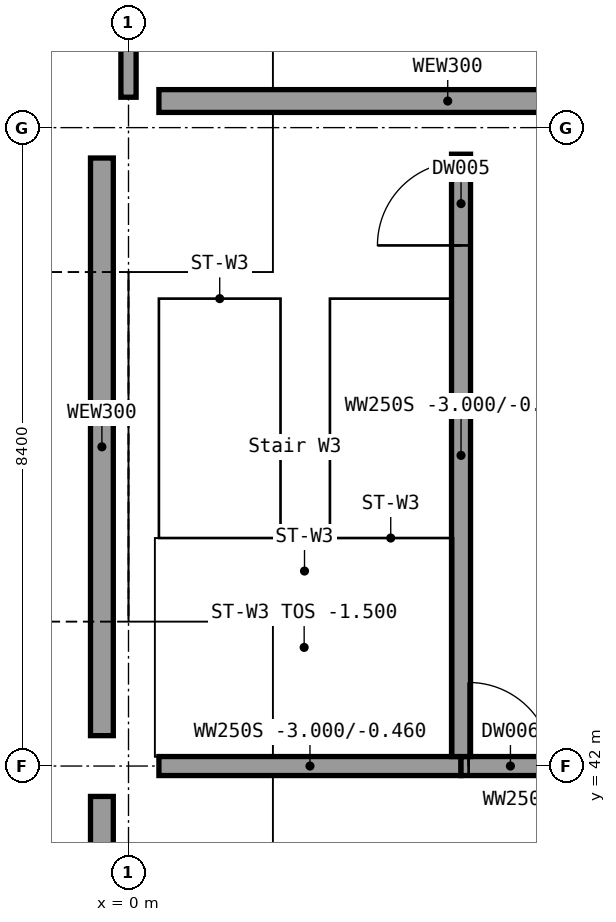
"""IFC4 building model, lengths in metres.
Left out: names, types, materials, properties, quantities, classifications, styles, units other than length and angle.
Written with IfcOpenShell. Run it as: python <this file> out.ifc"""

import sys

from ifc_helpers import new_model, si_unit, direction, frame, frame_2d, origin, origin_2d, place, context, subcontext, project, spatial, rectangle, extrude, element, fill, save


model = new_model("IFC4")
c1 = context("Model", 3, precision=1e-05, world=origin(), true_north=direction((0.0, 1.0)))
c2 = subcontext(c1, "Body", "Model", "MODEL_VIEW")
j1 = project(units=[si_unit("LENGTHUNIT", "METRE"), si_unit("PLANEANGLEUNIT", "RADIAN")], contexts=[c1])
p1 = place(None, origin())
s1 = spatial("IfcSite", under=j1, at=p1, CompositionType="ELEMENT")
p2 = place(p1, origin())
s2 = spatial("IfcBuilding", under=s1, at=p2, CompositionType="ELEMENT")
p3 = place(p2, frame((0.0, 0.0, -3.0)))
s3 = spatial("IfcBuildingStorey", under=s2, at=p3, CompositionType="ELEMENT", Elevation=-3.0)
for number, where, z_axis, x_axis in (
    (1, (0.0, 42.0, 0.0), (0.0, 0.0, 1.0), (1.0, 0.0, 0.0)),
    (2, (0.0, 50.4, 0.0), (0.0, 0.0, 1.0), (1.0, 0.0, 0.0)),
):
    element("IfcColumn", number, at=place(p3, frame(where, z_axis=z_axis, x_axis=x_axis)), inside=s3, PredefinedType="COLUMN", context=c2, shape_type="SweptSolid", body=[
        extrude(rectangle(XDim=0.8, YDim=0.8, at=origin_2d()), origin(), (0.0, 0.0, 1.0), 3.0),
    ])
p4 = place(p3, frame((0.0, 50.8, 0.0), z_axis=(0.0, 0.0, 1.0), x_axis=(0.0, 1.0, 0.0)))
e3 = element("IfcWall", 3, at=p4, inside=s3, PredefinedType="SOLIDWALL", context=c2, shape_type="SweptSolid", body=[
    extrude(rectangle(XDim=16.0, YDim=0.2, at=frame_2d((8.0, 0.0))), origin(), (0.0, 0.0, 1.0), 2.5),
])
for number, where, z_axis, x_axis in (
    (4, (0.4, 50.75, 0.0), (0.0, 0.0, 1.0), (1.0, 0.0, 0.0)),
    (5, (-0.35, 34.0, 0.0), (0.0, 0.0, 1.0), (0.0, 1.0, 0.0)),
    (6, (-0.35, 42.4, 0.0), (0.0, 0.0, 1.0), (0.0, 1.0, 0.0)),
):
    element("IfcWall", number, at=place(p3, frame(where, z_axis=z_axis, x_axis=x_axis)), inside=s3, PredefinedType="SOLIDWALL", context=c2, shape_type="SweptSolid", body=[
        extrude(rectangle(XDim=7.6, YDim=0.3, at=frame_2d((3.8, 0.0))), origin(), (0.0, 0.0, 1.0), 2.3),
    ])
p5 = place(p3, frame((0.4, 42.0, 0.0), z_axis=(0.0, 0.0, 1.0), x_axis=(1.0, 0.0, 0.0)))
e7 = element("IfcWall", 7, at=p5, inside=s3, PredefinedType="SHEAR", context=c2, shape_type="SweptSolid", body=[
    extrude(rectangle(XDim=3.975, YDim=0.25, at=frame_2d((1.988, 0.0))), origin(), (0.0, 0.0, 1.0), 2.54),
])
p6 = place(p3, frame((4.375, 42.0, 0.0), z_axis=(0.0, 0.0, 1.0), x_axis=(1.0, 0.0, 0.0)))
e8 = element("IfcWall", 8, at=p6, inside=s3, PredefinedType="SHEAR", context=c2, shape_type="SweptSolid", body=[
    extrude(rectangle(XDim=3.625, YDim=0.25, at=frame_2d((1.812, 0.0))), origin(), (0.0, 0.0, 1.0), 2.14),
])
p7 = place(p6, frame((0.1, 0.0, 0.0)))
e9 = element("IfcOpeningElement", 9, at=p7, cuts=e8, PredefinedType="OPENING", context=c2, shape_type="SweptSolid", body=[
    extrude(rectangle(XDim=1.1, YDim=2.1, at=frame_2d((0.55, 1.05))), frame((0.0, 0.125, 0.0), z_axis=(0.0, -1.0, 0.0), x_axis=(1.0, 0.0, 0.0)), (0.0, 0.0, 1.0), 0.25),
])
p8 = place(p3, frame((4.375, 42.125, 0.0), z_axis=(0.0, 0.0, 1.0), x_axis=(0.0, 1.0, 0.0)))
e10 = element("IfcWall", 10, at=p8, inside=s3, PredefinedType="SHEAR", context=c2, shape_type="SweptSolid", body=[
    extrude(rectangle(XDim=7.925, YDim=0.25, at=frame_2d((3.962, 0.0))), origin(), (0.0, 0.0, 1.0), 2.54),
])
p9 = place(p8, frame((6.725, 0.0, 0.0)))
e11 = element("IfcOpeningElement", 11, at=p9, cuts=e10, PredefinedType="OPENING", context=c2, shape_type="SweptSolid", body=[
    extrude(rectangle(XDim=1.1, YDim=2.1, at=frame_2d((0.55, 1.05))), frame((0.0, 0.125, 0.0), z_axis=(0.0, -1.0, 0.0), x_axis=(1.0, 0.0, 0.0)), (0.0, 0.0, 1.0), 0.25),
])
p10 = place(p9, origin())
e12 = element("IfcDoor", 12, at=p10, inside=s3, OperationType="SINGLE_SWING_RIGHT", PredefinedType="DOOR", context=c2, shape_type="SweptSolid", body=[
    extrude(rectangle(XDim=1.1, YDim=2.1, at=frame_2d((0.55, 1.05))), frame((0.0, 0.025, 0.0), z_axis=(0.0, -1.0, 0.0), x_axis=(1.0, 0.0, 0.0)), (0.0, 0.0, 1.0), 0.05),
])
fill(e11, e12)
p11 = place(p7, origin())
e13 = element("IfcDoor", 13, at=p11, inside=s3, OperationType="SINGLE_SWING_LEFT", PredefinedType="DOOR", context=c2, shape_type="SweptSolid", body=[
    extrude(rectangle(XDim=1.1, YDim=2.1, at=frame_2d((0.55, 1.05))), frame((0.0, 0.025, 0.0), z_axis=(0.0, -1.0, 0.0), x_axis=(1.0, 0.0, 0.0)), (0.0, 0.0, 1.0), 0.05),
])
fill(e9, e13)
save(model, sys.argv[1])
